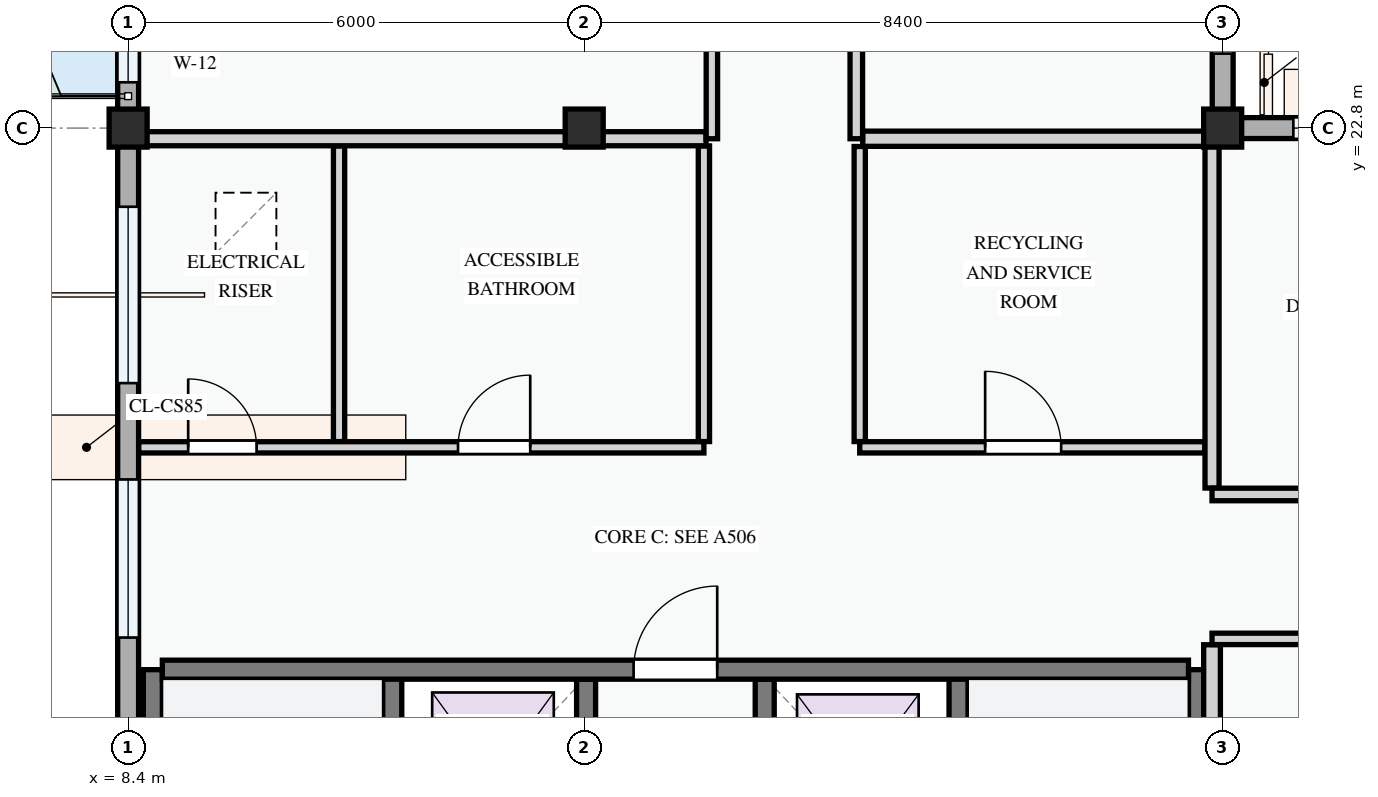
"""IFC4 building model, lengths in metres.
Left out: names, types, materials, properties, quantities, classifications, styles, units other than length and angle.
Written with IfcOpenShell. Run it as: python <this file> out.ifc"""

import sys

from ifc_helpers import new_model, si_unit, direction, frame, frame_2d, origin, origin_2d, place, context, subcontext, project, spatial, rectangle, extrude, element, fill, save


model = new_model("IFC4")
c1 = context("Model", 3, precision=1e-05, world=origin(), true_north=direction((0.0, 1.0)))
c2 = subcontext(c1, "Body", "Model", "MODEL_VIEW")
j1 = project(units=[si_unit("LENGTHUNIT", "METRE"), si_unit("PLANEANGLEUNIT", "RADIAN")], contexts=[c1])
p1 = place(None, origin())
s1 = spatial("IfcSite", under=j1, at=p1, CompositionType="ELEMENT")
p2 = place(p1, origin())
s2 = spatial("IfcBuilding", under=s1, at=p2, CompositionType="ELEMENT")
p3 = place(p2, frame((0.0, 0.0, 24.6)))
s3 = spatial("IfcBuildingStorey", under=s2, at=p3, CompositionType="ELEMENT", Elevation=24.6)
for number, where, z_axis, x_axis in (
    (1, (8.4, 22.8, 0.0), (0.0, 0.0, 1.0), (1.0, 0.0, 0.0)),
    (2, (14.4, 22.8, 0.0), (0.0, 0.0, 1.0), (1.0, 0.0, 0.0)),
    (3, (22.8, 22.8, 0.0), (0.0, 0.0, 1.0), (1.0, 0.0, 0.0)),
):
    element("IfcColumn", number, at=place(p3, frame(where, z_axis=z_axis, x_axis=x_axis)), inside=s3, PredefinedType="COLUMN", context=c2, shape_type="SweptSolid", body=[
        extrude(rectangle(XDim=0.5, YDim=0.5, at=origin_2d()), origin(), (0.0, 0.0, 1.0), 3.3),
    ])
p4 = place(p3, frame((22.8, 22.8, 0.0), z_axis=(0.0, 0.0, 1.0), x_axis=(0.0, 1.0, 0.0)))
e4 = element("IfcWall", 4, at=p4, inside=s3, PredefinedType="STANDARD", context=c2, shape_type="SweptSolid", body=[
    extrude(rectangle(XDim=6.0, YDim=0.275, at=frame_2d((3.0, 0.0))), origin(), (0.0, 0.0, 1.0), 2.575),
])
p5 = place(p4, frame((0.98, 0.0, 0.78)))
e5 = element("IfcOpeningElement", 5, at=p5, cuts=e4, PredefinedType="OPENING", context=c2, shape_type="SweptSolid", body=[
    extrude(rectangle(XDim=2.48, YDim=1.46, at=frame_2d((1.24, 0.73))), frame((0.0, 0.147, 0.0), z_axis=(0.0, -1.0, 0.0), x_axis=(1.0, 0.0, 0.0)), (0.0, 0.0, 1.0), 0.295),
])
p6 = place(p4, frame((4.555, 0.0, 0.78)))
e6 = element("IfcOpeningElement", 6, at=p6, cuts=e4, PredefinedType="OPENING", context=c2, shape_type="SweptSolid", body=[
    extrude(rectangle(XDim=0.95, YDim=1.15, at=frame_2d((0.475, 0.575))), frame((0.0, 0.147, 0.0), z_axis=(0.0, -1.0, 0.0), x_axis=(1.0, 0.0, 0.0)), (0.0, 0.0, 1.0), 0.295),
])
p7 = place(p3, frame((8.4, 28.8, 0.0), z_axis=(0.0, 0.0, 1.0), x_axis=(0.0, -1.0, 0.0)))
e7 = element("IfcWall", 7, at=p7, inside=s3, PredefinedType="STANDARD", context=c2, shape_type="SweptSolid", body=[
    extrude(rectangle(XDim=6.0, YDim=0.275, at=frame_2d((3.0, 0.0))), origin(), (0.0, 0.0, 1.0), 2.575),
])
p8 = place(p7, frame((2.085, 0.0, 0.0)))
e8 = element("IfcOpeningElement", 8, at=p8, cuts=e7, PredefinedType="OPENING", context=c2, shape_type="SweptSolid", body=[
    extrude(rectangle(XDim=1.3, YDim=2.15, at=frame_2d((0.65, 1.075))), frame((0.0, 0.147, 0.0), z_axis=(0.0, -1.0, 0.0), x_axis=(1.0, 0.0, 0.0)), (0.0, 0.0, 1.0), 0.295),
])
p9 = place(p7, frame((0.472, 0.0, 0.78)))
e9 = element("IfcOpeningElement", 9, at=p9, cuts=e7, PredefinedType="OPENING", context=c2, shape_type="SweptSolid", body=[
    extrude(rectangle(XDim=1.0, YDim=1.25, at=frame_2d((0.5, 0.625))), frame((0.0, 0.147, 0.0), z_axis=(0.0, -1.0, 0.0), x_axis=(1.0, 0.0, 0.0)), (0.0, 0.0, 1.0), 0.295),
])
p10 = place(p7, frame((3.847, 0.0, 0.78)))
e10 = element("IfcOpeningElement", 10, at=p10, cuts=e7, PredefinedType="OPENING", context=c2, shape_type="SweptSolid", body=[
    extrude(rectangle(XDim=1.55, YDim=1.4, at=frame_2d((0.775, 0.7))), frame((0.0, 0.147, 0.0), z_axis=(0.0, -1.0, 0.0), x_axis=(1.0, 0.0, 0.0)), (0.0, 0.0, 1.0), 0.295),
])
p11 = place(p3, frame((8.4, 22.8, 0.0), z_axis=(0.0, 0.0, 1.0), x_axis=(0.0, -1.0, 0.0)))
e11 = element("IfcWall", 11, at=p11, inside=s3, PredefinedType="STANDARD", context=c2, shape_type="SweptSolid", body=[
    extrude(rectangle(XDim=8.4, YDim=0.275, at=frame_2d((4.2, 0.0))), origin(), (0.0, 0.0, 1.0), 2.425),
])
p12 = place(p11, frame((1.035, 0.0, 0.78)))
e12 = element("IfcOpeningElement", 12, at=p12, cuts=e11, PredefinedType="OPENING", context=c2, shape_type="SweptSolid", body=[
    extrude(rectangle(XDim=2.32, YDim=1.5, at=frame_2d((1.16, 0.75))), frame((0.0, 0.147, 0.0), z_axis=(0.0, -1.0, 0.0), x_axis=(1.0, 0.0, 0.0)), (0.0, 0.0, 1.0), 0.295),
])
p13 = place(p11, frame((4.623, 0.0, 0.78)))
e13 = element("IfcOpeningElement", 13, at=p13, cuts=e11, PredefinedType="OPENING", context=c2, shape_type="SweptSolid", body=[
    extrude(rectangle(XDim=2.08, YDim=1.52, at=frame_2d((1.04, 0.76))), frame((0.0, 0.147, 0.0), z_axis=(0.0, -1.0, 0.0), x_axis=(1.0, 0.0, 0.0)), (0.0, 0.0, 1.0), 0.295),
])
p14 = place(p3, frame((28.8, 22.8, 0.0), z_axis=(0.0, 0.0, 1.0), x_axis=(-1.0, 0.0, 0.0)))
e14 = element("IfcWall", 14, at=p14, inside=s3, PredefinedType="STANDARD", context=c2, shape_type="SweptSolid", body=[
    extrude(rectangle(XDim=6.0, YDim=0.275, at=frame_2d((3.0, 0.0))), origin(), (0.0, 0.0, 1.0), 2.475),
])
p15 = place(p14, frame((0.52, 0.0, 0.78)))
e15 = element("IfcOpeningElement", 15, at=p15, cuts=e14, PredefinedType="OPENING", context=c2, shape_type="SweptSolid", body=[
    extrude(rectangle(XDim=0.9, YDim=1.2, at=frame_2d((0.45, 0.6))), frame((0.0, 0.147, 0.0), z_axis=(0.0, -1.0, 0.0), x_axis=(1.0, 0.0, 0.0)), (0.0, 0.0, 1.0), 0.295),
])
p16 = place(p14, frame((2.49, 0.0, 0.78)))
e16 = element("IfcOpeningElement", 16, at=p16, cuts=e14, PredefinedType="OPENING", context=c2, shape_type="SweptSolid", body=[
    extrude(rectangle(XDim=2.58, YDim=1.48, at=frame_2d((1.29, 0.74))), frame((0.0, 0.147, 0.0), z_axis=(0.0, -1.0, 0.0), x_axis=(1.0, 0.0, 0.0)), (0.0, 0.0, 1.0), 0.295),
])
p17 = place(p3, frame((11.875, 8.75, 0.0), z_axis=(0.0, 0.0, 1.0), x_axis=(0.0, 1.0, 0.0)))
e17 = element("IfcWall", 17, at=p17, inside=s3, PredefinedType="SHEAR", context=c2, shape_type="SweptSolid", body=[
    extrude(rectangle(XDim=6.925, YDim=0.25, at=frame_2d((3.462, 0.0))), origin(), (0.0, 0.0, 1.0), 3.0),
])
p18 = place(p17, frame((0.35, 0.0, 0.0)))
e18 = element("IfcOpeningElement", 18, at=p18, cuts=e17, PredefinedType="OPENING", context=c2, shape_type="SweptSolid", body=[
    extrude(rectangle(XDim=0.95, YDim=2.1, at=frame_2d((0.475, 1.05))), frame((0.0, 0.135, 0.0), z_axis=(0.0, -1.0, 0.0), x_axis=(1.0, 0.0, 0.0)), (0.0, 0.0, 1.0), 0.27),
])
p19 = place(p3, frame((8.725, 8.6, 0.0), z_axis=(0.0, 0.0, 1.0), x_axis=(0.0, 1.0, 0.0)))
e19 = element("IfcWall", 19, at=p19, inside=s3, PredefinedType="SHEAR", context=c2, shape_type="SweptSolid", body=[
    extrude(rectangle(XDim=7.075, YDim=0.25, at=frame_2d((3.538, 0.0))), origin(), (0.0, 0.0, 1.0), 3.0),
])
p20 = place(p3, frame((22.475, 8.75, 0.0), z_axis=(0.0, 0.0, 1.0), x_axis=(0.0, 1.0, 0.0)))
e20 = element("IfcWall", 20, at=p20, inside=s3, PredefinedType="SHEAR", context=c2, shape_type="SweptSolid", body=[
    extrude(rectangle(XDim=6.925, YDim=0.25, at=frame_2d((3.462, 0.0))), origin(), (0.0, 0.0, 1.0), 3.0),
])
p21 = place(p3, frame((19.325, 8.75, 0.0), z_axis=(0.0, 0.0, 1.0), x_axis=(0.0, 1.0, 0.0)))
e21 = element("IfcWall", 21, at=p21, inside=s3, PredefinedType="SHEAR", context=c2, shape_type="SweptSolid", body=[
    extrude(rectangle(XDim=6.925, YDim=0.25, at=frame_2d((3.462, 0.0))), origin(), (0.0, 0.0, 1.0), 3.0),
])
p22 = place(p21, frame((0.35, 0.0, 0.0)))
e22 = element("IfcOpeningElement", 22, at=p22, cuts=e21, PredefinedType="OPENING", context=c2, shape_type="SweptSolid", body=[
    extrude(rectangle(XDim=0.95, YDim=2.1, at=frame_2d((0.475, 1.05))), frame((0.0, 0.135, 0.0), z_axis=(0.0, -1.0, 0.0), x_axis=(1.0, 0.0, 0.0)), (0.0, 0.0, 1.0), 0.27),
])
for number, where, z_axis, x_axis in (
    (23, (14.425, 13.125, 0.0), (0.0, 0.0, 1.0), (0.0, 1.0, 0.0)),
    (24, (16.775, 13.125, 0.0), (0.0, 0.0, 1.0), (0.0, 1.0, 0.0)),
):
    element("IfcWall", number, at=place(p3, frame(where, z_axis=z_axis, x_axis=x_axis)), inside=s3, PredefinedType="SHEAR", context=c2, shape_type="SweptSolid", body=[
        extrude(rectangle(XDim=2.425, YDim=0.25, at=frame_2d((1.212, 0.0))), origin(), (0.0, 0.0, 1.0), 3.0),
    ])
p23 = place(p3, frame((8.85, 15.675, 0.0), z_axis=(0.0, 0.0, 1.0), x_axis=(1.0, 0.0, 0.0)))
e25 = element("IfcWall", 25, at=p23, inside=s3, PredefinedType="SHEAR", context=c2, shape_type="SweptSolid", body=[
    extrude(rectangle(XDim=13.5, YDim=0.25, at=frame_2d((6.75, 0.0))), origin(), (0.0, 0.0, 1.0), 3.0),
])
p24 = place(p23, frame((6.2, 0.0, 0.0)))
e26 = element("IfcOpeningElement", 26, at=p24, cuts=e25, PredefinedType="OPENING", context=c2, shape_type="SweptSolid", body=[
    extrude(rectangle(XDim=1.1, YDim=2.15, at=frame_2d((0.55, 1.075))), frame((0.0, 0.135, 0.0), z_axis=(0.0, -1.0, 0.0), x_axis=(1.0, 0.0, 0.0)), (0.0, 0.0, 1.0), 0.27),
])
for number, where, z_axis, x_axis in (
    (27, (11.175, 18.676, 0.0), (0.0, 0.0, 1.0), (0.0, 1.0, 0.0)),
    (28, (15.975, 18.676, 0.0), (0.0, 0.0, 1.0), (0.0, 1.0, 0.0)),
):
    element("IfcWall", number, at=place(p3, frame(where, z_axis=z_axis, x_axis=x_axis)), inside=s3, PredefinedType="PARTITIONING", context=c2, shape_type="SweptSolid", body=[
        extrude(rectangle(XDim=3.889, YDim=0.148, at=frame_2d((1.945, 0.0))), origin(), (0.0, 0.0, 1.0), 3.0),
    ])
p25 = place(p3, frame((18.025, 18.676, 0.0), z_axis=(0.0, 0.0, 1.0), x_axis=(0.0, 1.0, 0.0)))
e29 = element("IfcWall", 29, at=p25, inside=s3, PredefinedType="PARTITIONING", context=c2, shape_type="SweptSolid", body=[
    extrude(rectangle(XDim=3.882, YDim=0.148, at=frame_2d((1.941, 0.0))), origin(), (0.0, 0.0, 1.0), 3.0),
])
p26 = place(p3, frame((8.54, 18.6, 0.0), z_axis=(0.0, 0.0, 1.0), x_axis=(1.0, 0.0, 0.0)))
e30 = element("IfcWall", 30, at=p26, inside=s3, PredefinedType="PARTITIONING", context=c2, shape_type="SweptSolid", body=[
    extrude(rectangle(XDim=7.435, YDim=0.148, at=frame_2d((3.718, 0.0))), origin(), (0.0, 0.0, 1.0), 3.0),
])
p27 = place(p26, frame((0.65, 0.0, 0.0)))
e31 = element("IfcOpeningElement", 31, at=p27, cuts=e30, PredefinedType="OPENING", context=c2, shape_type="SweptSolid", body=[
    extrude(rectangle(XDim=0.9, YDim=2.1, at=frame_2d((0.45, 1.05))), frame((0.0, 0.084, 0.0), z_axis=(0.0, -1.0, 0.0), x_axis=(1.0, 0.0, 0.0)), (0.0, 0.0, 1.0), 0.168),
])
p28 = place(p26, frame((4.2, 0.0, 0.0)))
e32 = element("IfcOpeningElement", 32, at=p28, cuts=e30, PredefinedType="OPENING", context=c2, shape_type="SweptSolid", body=[
    extrude(rectangle(XDim=0.95, YDim=2.1, at=frame_2d((0.475, 1.05))), frame((0.0, 0.084, 0.0), z_axis=(0.0, -1.0, 0.0), x_axis=(1.0, 0.0, 0.0)), (0.0, 0.0, 1.0), 0.168),
])
p29 = place(p3, frame((18.025, 18.6, 0.0), z_axis=(0.0, 0.0, 1.0), x_axis=(1.0, 0.0, 0.0)))
e33 = element("IfcWall", 33, at=p29, inside=s3, PredefinedType="PARTITIONING", context=c2, shape_type="SweptSolid", body=[
    extrude(rectangle(XDim=4.541, YDim=0.148, at=frame_2d((2.27, 0.0))), origin(), (0.0, 0.0, 1.0), 3.0),
])
p30 = place(p29, frame((1.65, 0.0, 0.0)))
e34 = element("IfcOpeningElement", 34, at=p30, cuts=e33, PredefinedType="OPENING", context=c2, shape_type="SweptSolid", body=[
    extrude(rectangle(XDim=1.0, YDim=2.15, at=frame_2d((0.5, 1.075))), frame((0.0, 0.084, 0.0), z_axis=(0.0, -1.0, 0.0), x_axis=(1.0, 0.0, 0.0)), (0.0, 0.0, 1.0), 0.168),
])
p31 = place(p3, frame((8.54, 22.66, 0.0), z_axis=(0.0, 0.0, 1.0), x_axis=(1.0, 0.0, 0.0)))
e35 = element("IfcWall", 35, at=p31, inside=s3, PredefinedType="PARTITIONING", context=c2, shape_type="SweptSolid", body=[
    extrude(rectangle(XDim=7.463, YDim=0.185, at=frame_2d((3.732, 0.0))), origin(), (0.0, 0.0, 1.0), 2.375),
])
p32 = place(p3, frame((18.064, 22.66, 0.0), z_axis=(0.0, 0.0, 1.0), x_axis=(1.0, 0.0, 0.0)))
e36 = element("IfcWall", 36, at=p32, inside=s3, PredefinedType="PARTITIONING", context=c2, shape_type="SweptSolid", body=[
    extrude(rectangle(XDim=4.501, YDim=0.2, at=frame_2d((2.25, 0.0))), origin(), (0.0, 0.0, 1.0), 2.375),
])
p33 = place(p3, frame((16.08, 22.66, 0.0), z_axis=(0.0, 0.0, 1.0), x_axis=(0.0, 1.0, 0.0)))
e37 = element("IfcWall", 37, at=p33, inside=s3, PredefinedType="PARTITIONING", context=c2, shape_type="SweptSolid", body=[
    extrude(rectangle(XDim=34.801, YDim=0.15, at=frame_2d((17.4, 0.0))), origin(), (0.0, 0.0, 1.0), 3.0),
])
p34 = place(p33, frame((2.627, 0.0, 0.0)))
e38 = element("IfcOpeningElement", 38, at=p34, cuts=e37, PredefinedType="OPENING", context=c2, shape_type="SweptSolid", body=[
    extrude(rectangle(XDim=0.96, YDim=2.12, at=frame_2d((0.48, 1.06))), frame((0.0, 0.085, 0.0), z_axis=(0.0, -1.0, 0.0), x_axis=(1.0, 0.0, 0.0)), (0.0, 0.0, 1.0), 0.17),
])
p35 = place(p33, frame((10.02, 0.0, 0.0)))
e39 = element("IfcOpeningElement", 39, at=p35, cuts=e37, PredefinedType="OPENING", context=c2, shape_type="SweptSolid", body=[
    extrude(rectangle(XDim=0.92, YDim=2.1, at=frame_2d((0.46, 1.05))), frame((0.0, 0.085, 0.0), z_axis=(0.0, -1.0, 0.0), x_axis=(1.0, 0.0, 0.0)), (0.0, 0.0, 1.0), 0.17),
])
p36 = place(p33, frame((24.355, 0.0, 0.0)))
e40 = element("IfcOpeningElement", 40, at=p36, cuts=e37, PredefinedType="OPENING", context=c2, shape_type="SweptSolid", body=[
    extrude(rectangle(XDim=0.92, YDim=2.1, at=frame_2d((0.46, 1.05))), frame((0.0, 0.085, 0.0), z_axis=(0.0, -1.0, 0.0), x_axis=(1.0, 0.0, 0.0)), (0.0, 0.0, 1.0), 0.17),
])
p37 = place(p3, frame((17.98, 22.66, 0.0), z_axis=(0.0, 0.0, 1.0), x_axis=(0.0, 1.0, 0.0)))
e41 = element("IfcWall", 41, at=p37, inside=s3, PredefinedType="PARTITIONING", context=c2, shape_type="SweptSolid", body=[
    extrude(rectangle(XDim=34.801, YDim=0.165, at=frame_2d((17.4, 0.0))), origin(), (0.0, 0.0, 1.0), 3.0),
])
p38 = place(p37, frame((2.63, 0.0, 0.0)))
e42 = element("IfcOpeningElement", 42, at=p38, cuts=e41, PredefinedType="OPENING", context=c2, shape_type="SweptSolid", body=[
    extrude(rectangle(XDim=0.92, YDim=2.1, at=frame_2d((0.46, 1.05))), frame((0.0, 0.093, 0.0), z_axis=(0.0, -1.0, 0.0), x_axis=(1.0, 0.0, 0.0)), (0.0, 0.0, 1.0), 0.185),
])
p39 = place(p37, frame((10.02, 0.0, 0.0)))
e43 = element("IfcOpeningElement", 43, at=p39, cuts=e41, PredefinedType="OPENING", context=c2, shape_type="SweptSolid", body=[
    extrude(rectangle(XDim=0.92, YDim=2.1, at=frame_2d((0.46, 1.05))), frame((0.0, 0.093, 0.0), z_axis=(0.0, -1.0, 0.0), x_axis=(1.0, 0.0, 0.0)), (0.0, 0.0, 1.0), 0.185),
])
p40 = place(p37, frame((24.289, 0.0, 0.0)))
e44 = element("IfcOpeningElement", 44, at=p40, cuts=e41, PredefinedType="OPENING", context=c2, shape_type="SweptSolid", body=[
    extrude(rectangle(XDim=0.96, YDim=2.12, at=frame_2d((0.48, 1.06))), frame((0.0, 0.093, 0.0), z_axis=(0.0, -1.0, 0.0), x_axis=(1.0, 0.0, 0.0)), (0.0, 0.0, 1.0), 0.185),
])
p41 = place(p3, frame((22.66, 8.54, 0.0), z_axis=(0.0, 0.0, 1.0), x_axis=(0.0, 1.0, 0.0)))
e45 = element("IfcWall", 45, at=p41, inside=s3, PredefinedType="PARTITIONING", context=c2, shape_type="SweptSolid", body=[
    extrude(rectangle(XDim=7.463, YDim=0.22, at=frame_2d((3.732, 0.0))), origin(), (0.0, 0.0, 1.0), 2.425),
])
p42 = place(p3, frame((22.66, 18.064, 0.0), z_axis=(0.0, 0.0, 1.0), x_axis=(0.0, 1.0, 0.0)))
e46 = element("IfcWall", 46, at=p42, inside=s3, PredefinedType="PARTITIONING", context=c2, shape_type="SweptSolid", body=[
    extrude(rectangle(XDim=4.676, YDim=0.185, at=frame_2d((2.338, 0.0))), origin(), (0.0, 0.0, 1.0), 2.425),
])
p43 = place(p3, frame((22.66, 16.08, 0.0), z_axis=(0.0, 0.0, 1.0), x_axis=(1.0, 0.0, 0.0)))
e47 = element("IfcWall", 47, at=p43, inside=s3, PredefinedType="PARTITIONING", context=c2, shape_type="SweptSolid", body=[
    extrude(rectangle(XDim=34.88, YDim=0.15, at=frame_2d((17.44, 0.0))), origin(), (0.0, 0.0, 1.0), 3.0),
])
p44 = place(p43, frame((2.627, 0.0, 0.0)))
e48 = element("IfcOpeningElement", 48, at=p44, cuts=e47, PredefinedType="OPENING", context=c2, shape_type="SweptSolid", body=[
    extrude(rectangle(XDim=0.92, YDim=2.1, at=frame_2d((0.46, 1.05))), frame((0.0, 0.085, 0.0), z_axis=(0.0, -1.0, 0.0), x_axis=(1.0, 0.0, 0.0)), (0.0, 0.0, 1.0), 0.17),
])
p45 = place(p43, frame((10.02, 0.0, 0.0)))
e49 = element("IfcOpeningElement", 49, at=p45, cuts=e47, PredefinedType="OPENING", context=c2, shape_type="SweptSolid", body=[
    extrude(rectangle(XDim=0.96, YDim=2.12, at=frame_2d((0.48, 1.06))), frame((0.0, 0.085, 0.0), z_axis=(0.0, -1.0, 0.0), x_axis=(1.0, 0.0, 0.0)), (0.0, 0.0, 1.0), 0.17),
])
p46 = place(p43, frame((24.355, 0.0, 0.0)))
e50 = element("IfcOpeningElement", 50, at=p46, cuts=e47, PredefinedType="OPENING", context=c2, shape_type="SweptSolid", body=[
    extrude(rectangle(XDim=0.92, YDim=2.1, at=frame_2d((0.46, 1.05))), frame((0.0, 0.085, 0.0), z_axis=(0.0, -1.0, 0.0), x_axis=(1.0, 0.0, 0.0)), (0.0, 0.0, 1.0), 0.17),
])
p47 = place(p3, frame((22.66, 17.98, 0.0), z_axis=(0.0, 0.0, 1.0), x_axis=(1.0, 0.0, 0.0)))
e51 = element("IfcWall", 51, at=p47, inside=s3, PredefinedType="PARTITIONING", context=c2, shape_type="SweptSolid", body=[
    extrude(rectangle(XDim=34.88, YDim=0.165, at=frame_2d((17.44, 0.0))), origin(), (0.0, 0.0, 1.0), 3.0),
])
p48 = place(p47, frame((2.63, 0.0, 0.0)))
e52 = element("IfcOpeningElement", 52, at=p48, cuts=e51, PredefinedType="OPENING", context=c2, shape_type="SweptSolid", body=[
    extrude(rectangle(XDim=0.92, YDim=2.1, at=frame_2d((0.46, 1.05))), frame((0.0, 0.093, 0.0), z_axis=(0.0, -1.0, 0.0), x_axis=(1.0, 0.0, 0.0)), (0.0, 0.0, 1.0), 0.185),
])
p49 = place(p47, frame((10.02, 0.0, 0.0)))
e53 = element("IfcOpeningElement", 53, at=p49, cuts=e51, PredefinedType="OPENING", context=c2, shape_type="SweptSolid", body=[
    extrude(rectangle(XDim=0.92, YDim=2.1, at=frame_2d((0.46, 1.05))), frame((0.0, 0.093, 0.0), z_axis=(0.0, -1.0, 0.0), x_axis=(1.0, 0.0, 0.0)), (0.0, 0.0, 1.0), 0.185),
])
p50 = place(p47, frame((24.289, 0.0, 0.0)))
e54 = element("IfcOpeningElement", 54, at=p50, cuts=e51, PredefinedType="OPENING", context=c2, shape_type="SweptSolid", body=[
    extrude(rectangle(XDim=0.92, YDim=2.1, at=frame_2d((0.46, 1.05))), frame((0.0, 0.093, 0.0), z_axis=(0.0, -1.0, 0.0), x_axis=(1.0, 0.0, 0.0)), (0.0, 0.0, 1.0), 0.185),
])
p51 = place(p5, origin())
e55 = element("IfcWindow", 55, at=p51, inside=s3, PartitioningType="DOUBLE_PANEL_VERTICAL", PredefinedType="WINDOW", context=c2, shape_type="SweptSolid", body=[
    extrude(rectangle(XDim=2.48, YDim=1.46, at=frame_2d((1.24, 0.73))), frame((0.0, 0.03, 0.0), z_axis=(0.0, -1.0, 0.0), x_axis=(1.0, 0.0, 0.0)), (0.0, 0.0, 1.0), 0.06),
])
fill(e5, e55)
p52 = place(p10, origin())
e56 = element("IfcWindow", 56, at=p52, inside=s3, PartitioningType="SINGLE_PANEL", PredefinedType="WINDOW", context=c2, shape_type="SweptSolid", body=[
    extrude(rectangle(XDim=1.55, YDim=1.4, at=frame_2d((0.775, 0.7))), frame((0.0, 0.03, 0.0), z_axis=(0.0, -1.0, 0.0), x_axis=(1.0, 0.0, 0.0)), (0.0, 0.0, 1.0), 0.06),
])
fill(e10, e56)
p53 = place(p12, origin())
e57 = element("IfcWindow", 57, at=p53, inside=s3, PartitioningType="DOUBLE_PANEL_VERTICAL", PredefinedType="WINDOW", context=c2, shape_type="SweptSolid", body=[
    extrude(rectangle(XDim=2.32, YDim=1.5, at=frame_2d((1.16, 0.75))), frame((0.0, 0.03, 0.0), z_axis=(0.0, -1.0, 0.0), x_axis=(1.0, 0.0, 0.0)), (0.0, 0.0, 1.0), 0.06),
])
fill(e12, e57)
p54 = place(p13, origin())
e58 = element("IfcWindow", 58, at=p54, inside=s3, PartitioningType="DOUBLE_PANEL_VERTICAL", PredefinedType="WINDOW", context=c2, shape_type="SweptSolid", body=[
    extrude(rectangle(XDim=2.08, YDim=1.52, at=frame_2d((1.04, 0.76))), frame((0.0, 0.03, 0.0), z_axis=(0.0, -1.0, 0.0), x_axis=(1.0, 0.0, 0.0)), (0.0, 0.0, 1.0), 0.06),
])
fill(e13, e58)
p55 = place(p16, origin())
e59 = element("IfcWindow", 59, at=p55, inside=s3, PartitioningType="DOUBLE_PANEL_VERTICAL", PredefinedType="WINDOW", context=c2, shape_type="SweptSolid", body=[
    extrude(rectangle(XDim=2.58, YDim=1.48, at=frame_2d((1.29, 0.74))), frame((0.0, 0.03, 0.0), z_axis=(0.0, -1.0, 0.0), x_axis=(1.0, 0.0, 0.0)), (0.0, 0.0, 1.0), 0.06),
])
fill(e16, e59)
p56 = place(p24, origin())
e60 = element("IfcDoor", 60, at=p56, inside=s3, OperationType="SINGLE_SWING_RIGHT", PredefinedType="DOOR", context=c2, shape_type="SweptSolid", body=[
    extrude(rectangle(XDim=1.1, YDim=2.15, at=frame_2d((0.55, 1.075))), frame((0.0, 0.025, 0.0), z_axis=(0.0, -1.0, 0.0), x_axis=(1.0, 0.0, 0.0)), (0.0, 0.0, 1.0), 0.05),
])
fill(e26, e60)
p57 = place(p27, origin())
e61 = element("IfcDoor", 61, at=p57, inside=s3, OperationType="SINGLE_SWING_LEFT", PredefinedType="DOOR", context=c2, shape_type="SweptSolid", body=[
    extrude(rectangle(XDim=0.9, YDim=2.1, at=frame_2d((0.45, 1.05))), frame((0.0, 0.025, 0.0), z_axis=(0.0, -1.0, 0.0), x_axis=(1.0, 0.0, 0.0)), (0.0, 0.0, 1.0), 0.05),
])
fill(e31, e61)
p58 = place(p28, origin())
e62 = element("IfcDoor", 62, at=p58, inside=s3, OperationType="SINGLE_SWING_RIGHT", PredefinedType="DOOR", context=c2, shape_type="SweptSolid", body=[
    extrude(rectangle(XDim=0.95, YDim=2.1, at=frame_2d((0.475, 1.05))), frame((0.0, 0.025, 0.0), z_axis=(0.0, -1.0, 0.0), x_axis=(1.0, 0.0, 0.0)), (0.0, 0.0, 1.0), 0.05),
])
fill(e32, e62)
p59 = place(p30, origin())
e63 = element("IfcDoor", 63, at=p59, inside=s3, OperationType="SINGLE_SWING_LEFT", PredefinedType="DOOR", context=c2, shape_type="SweptSolid", body=[
    extrude(rectangle(XDim=1.0, YDim=2.15, at=frame_2d((0.5, 1.075))), frame((0.0, 0.025, 0.0), z_axis=(0.0, -1.0, 0.0), x_axis=(1.0, 0.0, 0.0)), (0.0, 0.0, 1.0), 0.05),
])
fill(e34, e63)
save(model, sys.argv[1])
